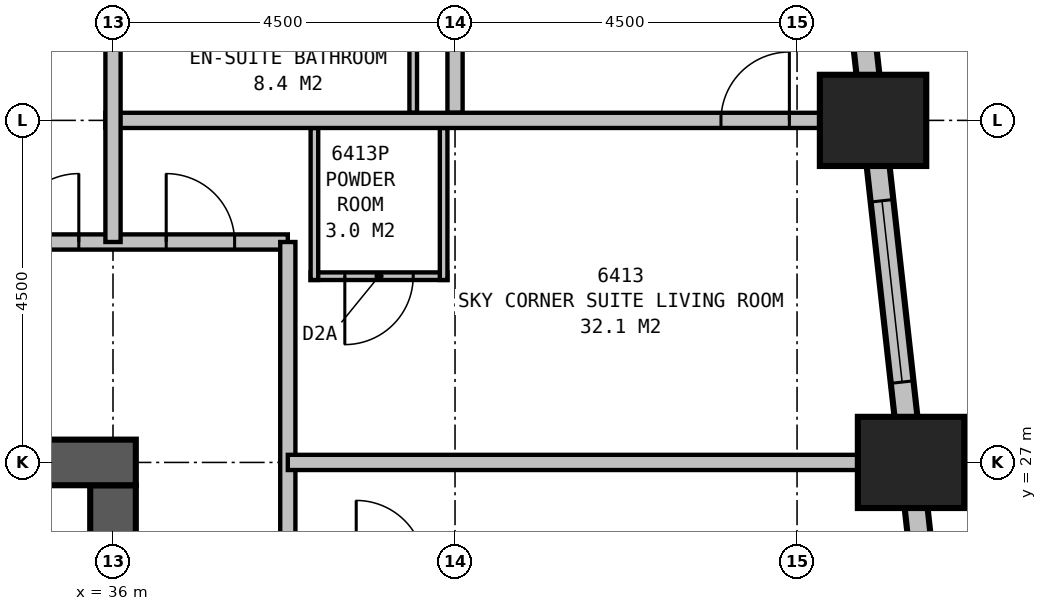
"""IFC4 building model, lengths in metres.
Left out: names, types, materials, properties, quantities, classifications, styles, units other than length and angle.
Written with IfcOpenShell. Run it as: python <this file> out.ifc"""

import sys

from ifc_helpers import new_model, si_unit, direction, frame, frame_2d, origin, origin_2d, place, context, subcontext, project, spatial, rectangle, extrude, element, fill, save


model = new_model("IFC4")
c1 = context("Model", 3, precision=1e-05, world=origin(), true_north=direction((0.0, 1.0)))
c2 = subcontext(c1, "Body", "Model", "MODEL_VIEW")
j1 = project(units=[si_unit("LENGTHUNIT", "METRE"), si_unit("PLANEANGLEUNIT", "RADIAN")], contexts=[c1])
p1 = place(None, origin())
s1 = spatial("IfcSite", under=j1, at=p1, CompositionType="ELEMENT")
p2 = place(p1, origin())
s2 = spatial("IfcBuilding", under=s1, at=p2, CompositionType="ELEMENT")
p3 = place(p2, frame((0.0, 0.0, 250.7)))
s3 = spatial("IfcBuildingStorey", under=s2, at=p3, CompositionType="ELEMENT", Elevation=250.7)
for number, where, z_axis, x_axis in (
    (1, (46.5, 27.0, 0.0), (0.0, 0.0, 1.0), (1.0, 0.0, 0.0)),
    (2, (46.0, 31.5, 0.0), (0.0, 0.0, 1.0), (1.0, 0.0, 0.0)),
):
    element("IfcColumn", number, at=place(p3, frame(where, z_axis=z_axis, x_axis=x_axis)), inside=s3, PredefinedType="COLUMN", context=c2, shape_type="SweptSolid", body=[
        extrude(rectangle(XDim=1.4, YDim=1.2, at=origin_2d()), origin(), (0.0, 0.0, 1.0), 3.9),
    ])
p4 = place(p3, frame((36.3, 27.0, 0.0), z_axis=(0.0, 0.0, 1.0), x_axis=(-1.0, 0.0, 0.0)))
e3 = element("IfcWall", 3, at=p4, inside=s3, PredefinedType="SHEAR", context=c2, shape_type="SweptSolid", body=[
    extrude(rectangle(XDim=23.6, YDim=0.6, at=frame_2d((11.8, 0.0))), origin(), (0.0, 0.0, 1.0), 3.9),
])
p5 = place(p4, frame((17.05, 0.0, 0.0)))
e4 = element("IfcOpeningElement", 4, at=p5, cuts=e3, PredefinedType="OPENING", context=c2, shape_type="SweptSolid", body=[
    extrude(rectangle(XDim=1.0, YDim=2.1, at=frame_2d((0.5, 1.05))), frame((0.0, 0.31, 0.0), z_axis=(0.0, -1.0, 0.0), x_axis=(1.0, 0.0, 0.0)), (0.0, 0.0, 1.0), 0.62),
])
p6 = place(p4, frame((12.05, 0.0, 0.0)))
e5 = element("IfcOpeningElement", 5, at=p6, cuts=e3, PredefinedType="OPENING", context=c2, shape_type="SweptSolid", body=[
    extrude(rectangle(XDim=1.0, YDim=2.1, at=frame_2d((0.5, 1.05))), frame((0.0, 0.31, 0.0), z_axis=(0.0, -1.0, 0.0), x_axis=(1.0, 0.0, 0.0)), (0.0, 0.0, 1.0), 0.62),
])
p7 = place(p4, frame((7.05, 0.0, 0.0)))
e6 = element("IfcOpeningElement", 6, at=p7, cuts=e3, PredefinedType="OPENING", context=c2, shape_type="SweptSolid", body=[
    extrude(rectangle(XDim=1.0, YDim=2.1, at=frame_2d((0.5, 1.05))), frame((0.0, 0.31, 0.0), z_axis=(0.0, -1.0, 0.0), x_axis=(1.0, 0.0, 0.0)), (0.0, 0.0, 1.0), 0.62),
])
p8 = place(p3, frame((36.0, 20.0, 0.0), z_axis=(0.0, 0.0, 1.0), x_axis=(0.0, 1.0, 0.0)))
e7 = element("IfcWall", 7, at=p8, inside=s3, PredefinedType="SHEAR", context=c2, shape_type="SweptSolid", body=[
    extrude(rectangle(XDim=6.7, YDim=0.6, at=frame_2d((3.35, 0.0))), origin(), (0.0, 0.0, 1.0), 3.9),
])
p9 = place(p3, frame((49.017, 4.351, 0.0), z_axis=(0.0, 0.0, 1.0), x_axis=(-0.110433201132, 0.993883548555, 0.0)))
e8 = element("IfcWall", 8, at=p9, inside=s3, PredefinedType="STANDARD", context=c2, shape_type="SweptSolid", body=[
    extrude(rectangle(XDim=31.994, YDim=0.3, at=frame_2d((15.997, 0.0))), origin(), (0.0, 0.0, 1.0), 2.65),
])
p10 = place(p9, frame((1.214, 0.0, 0.5)))
e9 = element("IfcOpeningElement", 9, at=p10, cuts=e8, PredefinedType="OPENING", context=c2, shape_type="SweptSolid", body=[
    extrude(rectangle(XDim=2.4, YDim=2.0, at=frame_2d((1.2, 1.0))), frame((0.0, 0.16, 0.0), z_axis=(0.0, -1.0, 0.0), x_axis=(1.0, 0.0, 0.0)), (0.0, 0.0, 1.0), 0.32),
])
p11 = place(p9, frame((5.742, 0.0, 0.5)))
e10 = element("IfcOpeningElement", 10, at=p11, cuts=e8, PredefinedType="OPENING", context=c2, shape_type="SweptSolid", body=[
    extrude(rectangle(XDim=2.4, YDim=2.0, at=frame_2d((1.2, 1.0))), frame((0.0, 0.16, 0.0), z_axis=(0.0, -1.0, 0.0), x_axis=(1.0, 0.0, 0.0)), (0.0, 0.0, 1.0), 0.32),
])
p12 = place(p9, frame((10.269, 0.0, 0.5)))
e11 = element("IfcOpeningElement", 11, at=p12, cuts=e8, PredefinedType="OPENING", context=c2, shape_type="SweptSolid", body=[
    extrude(rectangle(XDim=2.4, YDim=2.0, at=frame_2d((1.2, 1.0))), frame((0.0, 0.16, 0.0), z_axis=(0.0, -1.0, 0.0), x_axis=(1.0, 0.0, 0.0)), (0.0, 0.0, 1.0), 0.32),
])
p13 = place(p9, frame((14.797, 0.0, 0.5)))
e12 = element("IfcOpeningElement", 12, at=p13, cuts=e8, PredefinedType="OPENING", context=c2, shape_type="SweptSolid", body=[
    extrude(rectangle(XDim=2.4, YDim=2.0, at=frame_2d((1.2, 1.0))), frame((0.0, 0.16, 0.0), z_axis=(0.0, -1.0, 0.0), x_axis=(1.0, 0.0, 0.0)), (0.0, 0.0, 1.0), 0.32),
])
p14 = place(p9, frame((19.325, 0.0, 0.5)))
e13 = element("IfcOpeningElement", 13, at=p14, cuts=e8, PredefinedType="OPENING", context=c2, shape_type="SweptSolid", body=[
    extrude(rectangle(XDim=2.4, YDim=2.0, at=frame_2d((1.2, 1.0))), frame((0.0, 0.16, 0.0), z_axis=(0.0, -1.0, 0.0), x_axis=(1.0, 0.0, 0.0)), (0.0, 0.0, 1.0), 0.32),
])
p15 = place(p9, frame((23.852, 0.0, 0.5)))
e14 = element("IfcOpeningElement", 14, at=p15, cuts=e8, PredefinedType="OPENING", context=c2, shape_type="SweptSolid", body=[
    extrude(rectangle(XDim=2.4, YDim=2.0, at=frame_2d((1.2, 1.0))), frame((0.0, 0.16, 0.0), z_axis=(0.0, -1.0, 0.0), x_axis=(1.0, 0.0, 0.0)), (0.0, 0.0, 1.0), 0.32),
])
p16 = place(p9, frame((28.38, 0.0, 0.5)))
e15 = element("IfcOpeningElement", 15, at=p16, cuts=e8, PredefinedType="OPENING", context=c2, shape_type="SweptSolid", body=[
    extrude(rectangle(XDim=2.4, YDim=2.0, at=frame_2d((1.2, 1.0))), frame((0.0, 0.16, 0.0), z_axis=(0.0, -1.0, 0.0), x_axis=(1.0, 0.0, 0.0)), (0.0, 0.0, 1.0), 0.32),
])
p17 = place(p3, frame((12.473, 29.9, 0.0), z_axis=(0.0, 0.0, 1.0), x_axis=(1.0, 0.0, 0.0)))
e16 = element("IfcWall", 16, at=p17, inside=s3, PredefinedType="PARTITIONING", context=c2, shape_type="SweptSolid", body=[
    extrude(rectangle(XDim=25.827, YDim=0.2, at=frame_2d((12.914, 0.0))), origin(), (0.0, 0.0, 1.0), 3.65),
])
p18 = place(p17, frame((0.85, 0.0, 0.0)))
e17 = element("IfcOpeningElement", 17, at=p18, cuts=e16, PredefinedType="OPENING", context=c2, shape_type="SweptSolid", body=[
    extrude(rectangle(XDim=0.9, YDim=2.1, at=frame_2d((0.45, 1.05))), frame((0.0, 0.11, 0.0), z_axis=(0.0, -1.0, 0.0), x_axis=(1.0, 0.0, 0.0)), (0.0, 0.0, 1.0), 0.22),
])
p19 = place(p17, frame((8.677, 0.0, 0.0)))
e18 = element("IfcOpeningElement", 18, at=p19, cuts=e16, PredefinedType="OPENING", context=c2, shape_type="SweptSolid", body=[
    extrude(rectangle(XDim=0.9, YDim=2.1, at=frame_2d((0.45, 1.05))), frame((0.0, 0.11, 0.0), z_axis=(0.0, -1.0, 0.0), x_axis=(1.0, 0.0, 0.0)), (0.0, 0.0, 1.0), 0.22),
])
p20 = place(p17, frame((13.177, 0.0, 0.0)))
e19 = element("IfcOpeningElement", 19, at=p20, cuts=e16, PredefinedType="OPENING", context=c2, shape_type="SweptSolid", body=[
    extrude(rectangle(XDim=0.9, YDim=2.1, at=frame_2d((0.45, 1.05))), frame((0.0, 0.11, 0.0), z_axis=(0.0, -1.0, 0.0), x_axis=(1.0, 0.0, 0.0)), (0.0, 0.0, 1.0), 0.22),
])
p21 = place(p17, frame((17.677, 0.0, 0.0)))
e20 = element("IfcOpeningElement", 20, at=p21, cuts=e16, PredefinedType="OPENING", context=c2, shape_type="SweptSolid", body=[
    extrude(rectangle(XDim=0.9, YDim=2.1, at=frame_2d((0.45, 1.05))), frame((0.0, 0.11, 0.0), z_axis=(0.0, -1.0, 0.0), x_axis=(1.0, 0.0, 0.0)), (0.0, 0.0, 1.0), 0.22),
])
p22 = place(p17, frame((22.177, 0.0, 0.0)))
e21 = element("IfcOpeningElement", 21, at=p22, cuts=e16, PredefinedType="OPENING", context=c2, shape_type="SweptSolid", body=[
    extrude(rectangle(XDim=0.9, YDim=2.1, at=frame_2d((0.45, 1.05))), frame((0.0, 0.11, 0.0), z_axis=(0.0, -1.0, 0.0), x_axis=(1.0, 0.0, 0.0)), (0.0, 0.0, 1.0), 0.22),
])
p23 = place(p17, frame((24.227, 0.0, 0.0)))
e22 = element("IfcOpeningElement", 22, at=p23, cuts=e16, PredefinedType="OPENING", context=c2, shape_type="SweptSolid", body=[
    extrude(rectangle(XDim=0.9, YDim=2.1, at=frame_2d((0.45, 1.05))), frame((0.0, 0.11, 0.0), z_axis=(0.0, -1.0, 0.0), x_axis=(1.0, 0.0, 0.0)), (0.0, 0.0, 1.0), 0.22),
])
p24 = place(p3, frame((38.3, 11.2, 0.0), z_axis=(0.0, 0.0, 1.0), x_axis=(0.0, 1.0, 0.0)))
e23 = element("IfcWall", 23, at=p24, inside=s3, PredefinedType="PARTITIONING", context=c2, shape_type="SweptSolid", body=[
    extrude(rectangle(XDim=18.7, YDim=0.2, at=frame_2d((9.35, 0.0))), origin(), (0.0, 0.0, 1.0), 3.65),
])
p25 = place(p24, frame((6.45, 0.0, 0.0), z_axis=(0.0, 0.0, 1.0), x_axis=(-1.0, 0.0, 0.0)))
e24 = element("IfcOpeningElement", 24, at=p25, cuts=e23, PredefinedType="OPENING", context=c2, shape_type="SweptSolid", body=[
    extrude(rectangle(XDim=1.0, YDim=2.1, at=frame_2d((0.5, 1.05))), frame((0.0, 0.11, 0.0), z_axis=(0.0, -1.0, 0.0), x_axis=(1.0, 0.0, 0.0)), (0.0, 0.0, 1.0), 0.22),
])
p26 = place(p24, frame((10.45, 0.0, 0.0), z_axis=(0.0, 0.0, 1.0), x_axis=(-1.0, 0.0, 0.0)))
e25 = element("IfcOpeningElement", 25, at=p26, cuts=e23, PredefinedType="OPENING", context=c2, shape_type="SweptSolid", body=[
    extrude(rectangle(XDim=0.9, YDim=2.1, at=frame_2d((0.45, 1.05))), frame((0.0, 0.11, 0.0), z_axis=(0.0, -1.0, 0.0), x_axis=(1.0, 0.0, 0.0)), (0.0, 0.0, 1.0), 0.22),
])
p27 = place(p3, frame((38.3, 27.0, 0.0), z_axis=(0.0, 0.0, 1.0), x_axis=(1.0, 0.0, 0.0)))
e26 = element("IfcWall", 26, at=p27, inside=s3, PredefinedType="PARTITIONING", context=c2, shape_type="SweptSolid", body=[
    extrude(rectangle(XDim=7.977, YDim=0.2, at=frame_2d((3.988, 0.0))), origin(), (0.0, 0.0, 1.0), 2.35),
])
p28 = place(p3, frame((36.0, 29.9, 0.0), z_axis=(0.0, 0.0, 1.0), x_axis=(0.0, 1.0, 0.0)))
e27 = element("IfcWall", 27, at=p28, inside=s3, PredefinedType="PARTITIONING", context=c2, shape_type="SweptSolid", body=[
    extrude(rectangle(XDim=10.6, YDim=0.2, at=frame_2d((5.3, 0.0))), origin(), (0.0, 0.0, 1.0), 2.65),
])
p29 = place(p3, frame((35.9, 31.5, 0.0), z_axis=(0.0, 0.0, 1.0), x_axis=(1.0, 0.0, 0.0)))
e28 = element("IfcWall", 28, at=p29, inside=s3, PredefinedType="PARTITIONING", context=c2, shape_type="SweptSolid", body=[
    extrude(rectangle(XDim=10.099, YDim=0.2, at=frame_2d((5.05, 0.0))), origin(), (0.0, 0.0, 1.0), 3.65),
])
p30 = place(p29, frame((8.099, 0.0, 0.0)))
e29 = element("IfcOpeningElement", 29, at=p30, cuts=e28, PredefinedType="OPENING", context=c2, shape_type="SweptSolid", body=[
    extrude(rectangle(XDim=0.9, YDim=2.1, at=frame_2d((0.45, 1.05))), frame((0.0, 0.11, 0.0), z_axis=(0.0, -1.0, 0.0), x_axis=(1.0, 0.0, 0.0)), (0.0, 0.0, 1.0), 0.22),
])
p31 = place(p3, frame((40.35, 31.4, 0.0), z_axis=(0.0, 0.0, 1.0), x_axis=(0.0, -1.0, 0.0)))
e30 = element("IfcWall", 30, at=p31, inside=s3, PredefinedType="PLUMBINGWALL", context=c2, shape_type="SweptSolid", body=[
    extrude(rectangle(XDim=2.0, YDim=0.1, at=frame_2d((1.0, 0.0))), origin(), (0.0, 0.0, 1.0), 2.75),
])
p32 = place(p3, frame((38.65, 31.4, 0.0), z_axis=(0.0, 0.0, 1.0), x_axis=(0.0, -1.0, 0.0)))
e31 = element("IfcWall", 31, at=p32, inside=s3, PredefinedType="PLUMBINGWALL", context=c2, shape_type="SweptSolid", body=[
    extrude(rectangle(XDim=2.0, YDim=0.1, at=frame_2d((1.0, 0.0))), origin(), (0.0, 0.0, 1.0), 3.65),
])
p33 = place(p3, frame((38.6, 29.45, 0.0), z_axis=(0.0, 0.0, 1.0), x_axis=(1.0, 0.0, 0.0)))
e32 = element("IfcWall", 32, at=p33, inside=s3, PredefinedType="PLUMBINGWALL", context=c2, shape_type="SweptSolid", body=[
    extrude(rectangle(XDim=1.8, YDim=0.1, at=frame_2d((0.9, 0.0))), origin(), (0.0, 0.0, 1.0), 3.65),
])
p34 = place(p33, frame((1.35, 0.0, 0.0), z_axis=(0.0, 0.0, 1.0), x_axis=(-1.0, 0.0, 0.0)))
e33 = element("IfcOpeningElement", 33, at=p34, cuts=e32, PredefinedType="OPENING", context=c2, shape_type="SweptSolid", body=[
    extrude(rectangle(XDim=0.9, YDim=2.1, at=frame_2d((0.45, 1.05))), frame((0.0, 0.06, 0.0), z_axis=(0.0, -1.0, 0.0), x_axis=(1.0, 0.0, 0.0)), (0.0, 0.0, 1.0), 0.12),
])
p35 = place(p3, frame((40.5, 31.6, 0.0), z_axis=(0.0, 0.0, 1.0), x_axis=(0.0, 1.0, 0.0)))
e34 = element("IfcWall", 34, at=p35, inside=s3, PredefinedType="PARTITIONING", context=c2, shape_type="SweptSolid", body=[
    extrude(rectangle(XDim=4.4, YDim=0.2, at=frame_2d((2.2, 0.0))), origin(), (0.0, 0.0, 1.0), 2.75),
])
p36 = place(p35, frame((2.6, 0.0, 0.0)))
e35 = element("IfcOpeningElement", 35, at=p36, cuts=e34, PredefinedType="OPENING", context=c2, shape_type="SweptSolid", body=[
    extrude(rectangle(XDim=0.9, YDim=2.1, at=frame_2d((0.45, 1.05))), frame((0.0, 0.11, 0.0), z_axis=(0.0, -1.0, 0.0), x_axis=(1.0, 0.0, 0.0)), (0.0, 0.0, 1.0), 0.22),
])
p37 = place(p3, frame((39.95, 31.6, 0.0), z_axis=(0.0, 0.0, 1.0), x_axis=(0.0, 1.0, 0.0)))
e36 = element("IfcWall", 36, at=p37, inside=s3, PredefinedType="PLUMBINGWALL", context=c2, shape_type="SweptSolid", body=[
    extrude(rectangle(XDim=2.3, YDim=0.1, at=frame_2d((1.15, 0.0))), origin(), (0.0, 0.0, 1.0), 3.65),
])
p38 = place(p15, origin())
e37 = element("IfcWindow", 37, at=p38, inside=s3, PartitioningType="SINGLE_PANEL", PredefinedType="WINDOW", context=c2, shape_type="SweptSolid", body=[
    extrude(rectangle(XDim=2.4, YDim=2.0, at=frame_2d((1.2, 1.0))), frame((0.0, 0.03, 0.0), z_axis=(0.0, -1.0, 0.0), x_axis=(1.0, 0.0, 0.0)), (0.0, 0.0, 1.0), 0.06),
])
fill(e14, e37)
p39 = place(p22, origin())
e38 = element("IfcDoor", 38, at=p39, inside=s3, OperationType="SINGLE_SWING_RIGHT", PredefinedType="DOOR", context=c2, shape_type="SweptSolid", body=[
    extrude(rectangle(XDim=0.9, YDim=2.1, at=frame_2d((0.45, 1.05))), frame((0.0, 0.025, 0.0), z_axis=(0.0, -1.0, 0.0), x_axis=(1.0, 0.0, 0.0)), (0.0, 0.0, 1.0), 0.05),
])
fill(e21, e38)
p40 = place(p23, origin())
e39 = element("IfcDoor", 39, at=p40, inside=s3, OperationType="SINGLE_SWING_LEFT", PredefinedType="DOOR", context=c2, shape_type="SweptSolid", body=[
    extrude(rectangle(XDim=0.9, YDim=2.1, at=frame_2d((0.45, 1.05))), frame((0.0, 0.025, 0.0), z_axis=(0.0, -1.0, 0.0), x_axis=(1.0, 0.0, 0.0)), (0.0, 0.0, 1.0), 0.05),
])
fill(e22, e39)
p41 = place(p30, origin())
e40 = element("IfcDoor", 40, at=p41, inside=s3, OperationType="SINGLE_SWING_RIGHT", PredefinedType="DOOR", context=c2, shape_type="SweptSolid", body=[
    extrude(rectangle(XDim=0.9, YDim=2.1, at=frame_2d((0.45, 1.05))), frame((0.0, 0.025, 0.0), z_axis=(0.0, -1.0, 0.0), x_axis=(1.0, 0.0, 0.0)), (0.0, 0.0, 1.0), 0.05),
])
fill(e29, e40)
p42 = place(p34, origin())
e41 = element("IfcDoor", 41, at=p42, inside=s3, OperationType="SINGLE_SWING_RIGHT", PredefinedType="DOOR", context=c2, shape_type="SweptSolid", body=[
    extrude(rectangle(XDim=0.9, YDim=2.1, at=frame_2d((0.45, 1.05))), frame((0.0, 0.025, 0.0), z_axis=(0.0, -1.0, 0.0), x_axis=(1.0, 0.0, 0.0)), (0.0, 0.0, 1.0), 0.05),
])
fill(e33, e41)
save(model, sys.argv[1])
